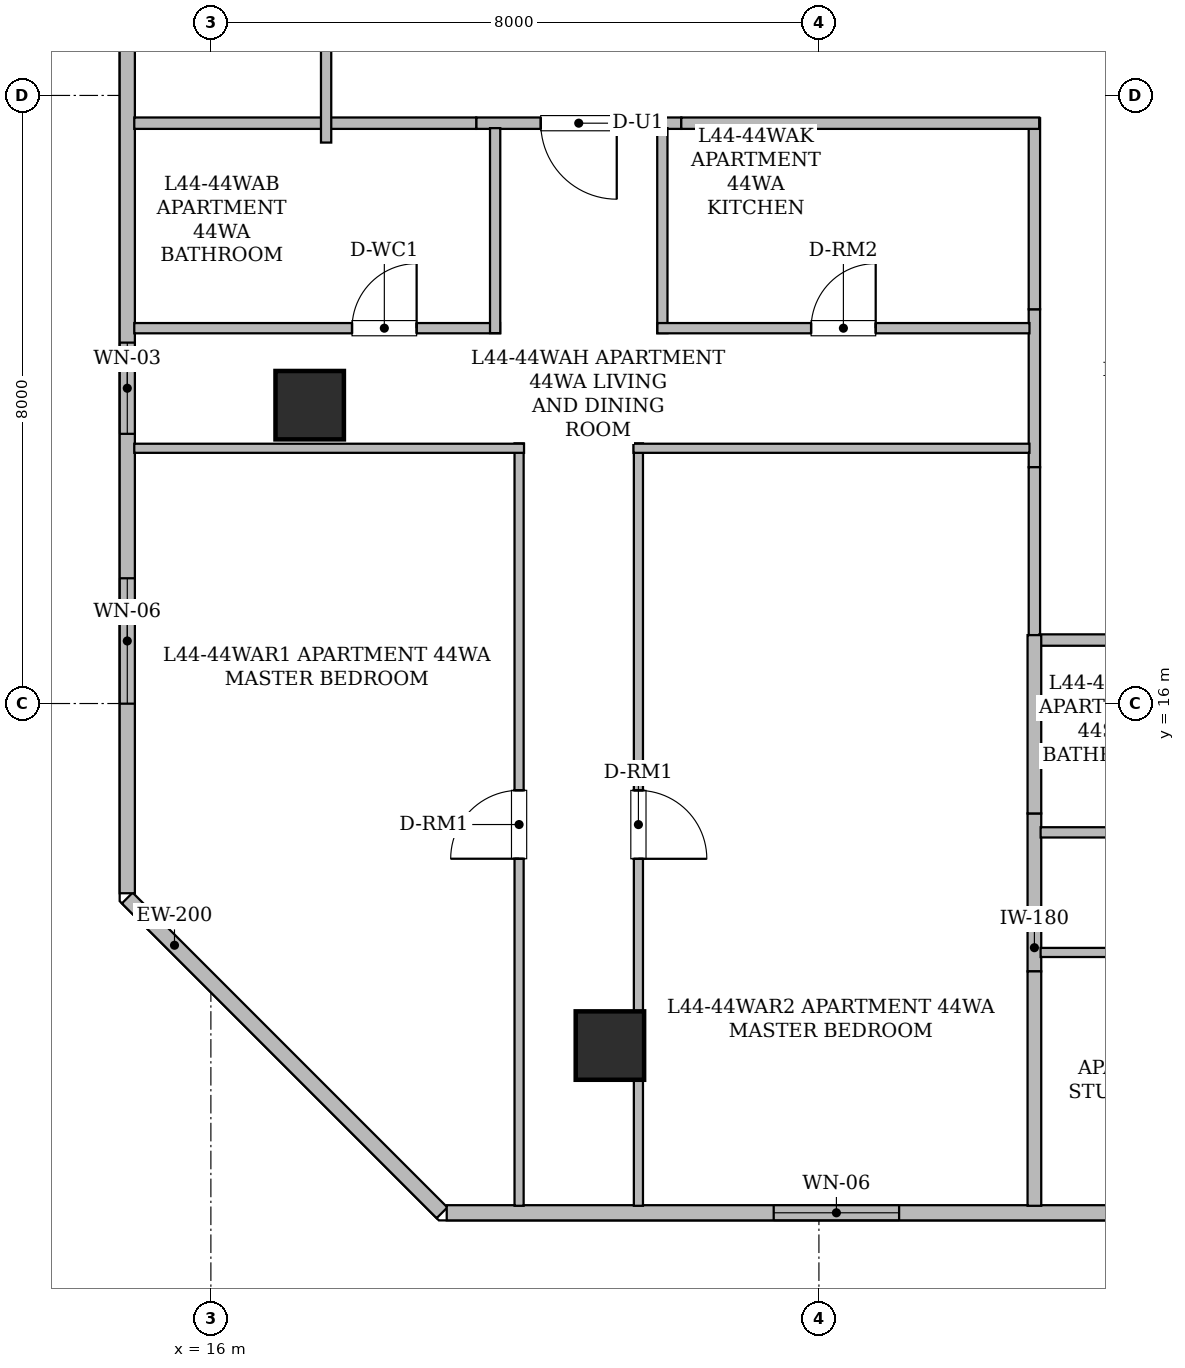
"""IFC4 building model, lengths in metres.
Left out: names, types, materials, properties, quantities, classifications, styles, units other than length and angle.
Written with IfcOpenShell. Run it as: python <this file> out.ifc"""

import sys

from ifc_helpers import new_model, si_unit, direction, frame, frame_2d, origin, origin_2d, place, context, subcontext, project, spatial, rectangle, hollow_rectangle, extrude, element, fill, save


model = new_model("IFC4")
c1 = context("Model", 3, precision=1e-05, world=origin(), true_north=direction((0.0, 1.0)))
c2 = subcontext(c1, "Body", "Model", "MODEL_VIEW")
j1 = project(units=[si_unit("LENGTHUNIT", "METRE"), si_unit("PLANEANGLEUNIT", "RADIAN")], contexts=[c1])
p1 = place(None, origin())
s1 = spatial("IfcSite", under=j1, at=p1, CompositionType="ELEMENT")
p2 = place(p1, origin())
s2 = spatial("IfcBuilding", under=s1, at=p2, CompositionType="ELEMENT")
p3 = place(p2, frame((0.0, 0.0, 174.15)))
s3 = spatial("IfcBuildingStorey", under=s2, at=p3, CompositionType="ELEMENT", Elevation=174.15)
for number, where, z_axis, x_axis in (
    (1, (21.25, 11.5, 0.0), (0.0, 0.0, 1.0), (1.0, 0.0, 0.0)),
    (2, (17.3, 19.925, 0.0), (0.0, 0.0, 1.0), (1.0, 0.0, 0.0)),
):
    element("IfcColumn", number, at=place(p3, frame(where, z_axis=z_axis, x_axis=x_axis)), inside=s3, PredefinedType="COLUMN", context=c2, shape_type="SweptSolid", body=[
        extrude(hollow_rectangle(XDim=0.9, YDim=0.9, WallThickness=0.045, at=origin_2d()), origin(), (0.0, 0.0, 1.0), 3.65),
    ])
p4 = place(p3, frame((19.041, 9.3, 0.0), z_axis=(0.0, 0.0, 1.0), x_axis=(-0.707127625344, 0.707085936414, 0.0)))
e3 = element("IfcWall", 3, at=p4, inside=s3, PredefinedType="STANDARD", context=c2, shape_type="SweptSolid", body=[
    extrude(rectangle(XDim=5.856, YDim=0.2, at=frame_2d((2.928, 0.0))), origin(), (0.0, 0.0, 1.0), 3.43),
])
p5 = place(p3, frame((14.9, 13.504, 0.0), z_axis=(0.0, 0.0, 1.0), x_axis=(0.0, 1.0, 0.0)))
e4 = element("IfcWall", 4, at=p5, inside=s3, PredefinedType="STANDARD", context=c2, shape_type="SweptSolid", body=[
    extrude(rectangle(XDim=11.263, YDim=0.2, at=frame_2d((5.632, 0.0))), origin(), (0.0, 0.0, 1.0), 3.43),
])
p6 = place(p5, frame((6.044, 0.0, 0.8)))
e5 = element("IfcOpeningElement", 5, at=p6, cuts=e4, PredefinedType="OPENING", context=c2, shape_type="SweptSolid", body=[
    extrude(rectangle(XDim=1.2, YDim=1.5, at=frame_2d((0.6, 0.75))), frame((0.0, 0.11, 0.0), z_axis=(0.0, -1.0, 0.0), x_axis=(1.0, 0.0, 0.0)), (0.0, 0.0, 1.0), 0.22),
])
p7 = place(p5, frame((2.494, 0.0, 0.85)))
e6 = element("IfcOpeningElement", 6, at=p7, cuts=e4, PredefinedType="OPENING", context=c2, shape_type="SweptSolid", body=[
    extrude(rectangle(XDim=1.65, YDim=1.55, at=frame_2d((0.825, 0.775))), frame((0.0, 0.11, 0.0), z_axis=(0.0, -1.0, 0.0), x_axis=(1.0, 0.0, 0.0)), (0.0, 0.0, 1.0), 0.22),
])
p8 = place(p3, frame((58.896, 9.3, 0.0), z_axis=(0.0, 0.0, 1.0), x_axis=(-1.0, 0.0, 0.0)))
e7 = element("IfcWall", 7, at=p8, inside=s3, PredefinedType="STANDARD", context=c2, shape_type="SweptSolid", body=[
    extrude(rectangle(XDim=39.793, YDim=0.2, at=frame_2d((19.896, 0.0))), origin(), (0.0, 0.0, 1.0), 3.43),
])
p9 = place(p8, frame((33.841, 0.0, 0.85)))
e8 = element("IfcOpeningElement", 8, at=p9, cuts=e7, PredefinedType="OPENING", context=c2, shape_type="SweptSolid", body=[
    extrude(rectangle(XDim=1.65, YDim=1.55, at=frame_2d((0.825, 0.775))), frame((0.0, 0.11, 0.0), z_axis=(0.0, -1.0, 0.0), x_axis=(1.0, 0.0, 0.0)), (0.0, 0.0, 1.0), 0.22),
])
p10 = place(p8, frame((27.808, 0.0, 0.85)))
e9 = element("IfcOpeningElement", 9, at=p10, cuts=e7, PredefinedType="OPENING", context=c2, shape_type="SweptSolid", body=[
    extrude(rectangle(XDim=1.65, YDim=1.55, at=frame_2d((0.825, 0.775))), frame((0.0, 0.11, 0.0), z_axis=(0.0, -1.0, 0.0), x_axis=(1.0, 0.0, 0.0)), (0.0, 0.0, 1.0), 0.22),
])
p11 = place(p8, frame((20.418, 0.0, 0.85)))
e10 = element("IfcOpeningElement", 10, at=p11, cuts=e7, PredefinedType="OPENING", context=c2, shape_type="SweptSolid", body=[
    extrude(rectangle(XDim=1.65, YDim=1.55, at=frame_2d((0.825, 0.775))), frame((0.0, 0.11, 0.0), z_axis=(0.0, -1.0, 0.0), x_axis=(1.0, 0.0, 0.0)), (0.0, 0.0, 1.0), 0.22),
])
p12 = place(p8, frame((14.869, 0.0, 0.85)))
e11 = element("IfcOpeningElement", 11, at=p12, cuts=e7, PredefinedType="OPENING", context=c2, shape_type="SweptSolid", body=[
    extrude(rectangle(XDim=1.65, YDim=1.55, at=frame_2d((0.825, 0.775))), frame((0.0, 0.11, 0.0), z_axis=(0.0, -1.0, 0.0), x_axis=(1.0, 0.0, 0.0)), (0.0, 0.0, 1.0), 0.22),
])
p13 = place(p8, frame((12.718, 0.0, 0.8)))
e12 = element("IfcOpeningElement", 12, at=p13, cuts=e7, PredefinedType="OPENING", context=c2, shape_type="SweptSolid", body=[
    extrude(rectangle(XDim=1.2, YDim=1.5, at=frame_2d((0.6, 0.75))), frame((0.0, 0.11, 0.0), z_axis=(0.0, -1.0, 0.0), x_axis=(1.0, 0.0, 0.0)), (0.0, 0.0, 1.0), 0.22),
])
p14 = place(p8, frame((8.394, 0.0, 0.85)))
e13 = element("IfcOpeningElement", 13, at=p14, cuts=e7, PredefinedType="OPENING", context=c2, shape_type="SweptSolid", body=[
    extrude(rectangle(XDim=1.65, YDim=1.55, at=frame_2d((0.825, 0.775))), frame((0.0, 0.11, 0.0), z_axis=(0.0, -1.0, 0.0), x_axis=(1.0, 0.0, 0.0)), (0.0, 0.0, 1.0), 0.22),
])
p15 = place(p8, frame((2.936, 0.0, 0.85)))
e14 = element("IfcOpeningElement", 14, at=p15, cuts=e7, PredefinedType="OPENING", context=c2, shape_type="SweptSolid", body=[
    extrude(rectangle(XDim=1.65, YDim=1.55, at=frame_2d((0.825, 0.775))), frame((0.0, 0.11, 0.0), z_axis=(0.0, -1.0, 0.0), x_axis=(1.0, 0.0, 0.0)), (0.0, 0.0, 1.0), 0.22),
])
p16 = place(p3, frame((26.835, 19.109, 0.0), z_axis=(0.0, 0.0, 1.0), x_axis=(0.0, 1.0, 0.0)))
e15 = element("IfcWall", 15, at=p16, inside=s3, PredefinedType="STANDARD", context=c2, shape_type="SweptSolid", body=[
    extrude(rectangle(XDim=2.078, YDim=0.15, at=frame_2d((1.039, 0.0))), origin(), (0.0, 0.0, 1.0), 2.725),
])
p17 = place(p3, frame((22.189, 23.635, 0.0), z_axis=(0.0, 0.0, 1.0), x_axis=(-1.0, 0.0, 0.0)))
e16 = element("IfcWall", 16, at=p17, inside=s3, PredefinedType="STANDARD", context=c2, shape_type="SweptSolid", body=[
    extrude(rectangle(XDim=2.698, YDim=0.15, at=frame_2d((1.349, 0.0))), origin(), (0.0, 0.0, 1.0), 3.43),
])
p18 = place(p17, frame((0.849, 0.0, 0.0)))
e17 = element("IfcOpeningElement", 17, at=p18, cuts=e16, PredefinedType="OPENING", context=c2, shape_type="SweptSolid", body=[
    extrude(rectangle(XDim=1.0, YDim=2.15, at=frame_2d((0.5, 1.075))), frame((0.0, 0.085, 0.0), z_axis=(0.0, -1.0, 0.0), x_axis=(1.0, 0.0, 0.0)), (0.0, 0.0, 1.0), 0.17),
])
p19 = place(p3, frame((19.491, 23.635, 0.0), z_axis=(0.0, 0.0, 1.0), x_axis=(-1.0, 0.0, 0.0)))
e18 = element("IfcWall", 18, at=p19, inside=s3, PredefinedType="STANDARD", context=c2, shape_type="SweptSolid", body=[
    extrude(rectangle(XDim=4.499, YDim=0.15, at=frame_2d((2.25, 0.0))), origin(), (0.0, 0.0, 1.0), 2.876),
])
p20 = place(p3, frame((26.835, 21.187, 0.0), z_axis=(0.0, 0.0, 1.0), x_axis=(0.0, 1.0, 0.0)))
e19 = element("IfcWall", 19, at=p20, inside=s3, PredefinedType="STANDARD", context=c2, shape_type="SweptSolid", body=[
    extrude(rectangle(XDim=2.513, YDim=0.15, at=frame_2d((1.256, 0.0))), origin(), (0.0, 0.0, 1.0), 3.43),
])
p21 = place(p3, frame((26.898, 23.635, 0.0), z_axis=(0.0, 0.0, 1.0), x_axis=(-1.0, 0.0, 0.0)))
e20 = element("IfcWall", 20, at=p21, inside=s3, PredefinedType="STANDARD", context=c2, shape_type="SweptSolid", body=[
    extrude(rectangle(XDim=4.709, YDim=0.15, at=frame_2d((2.354, 0.0))), origin(), (0.0, 0.0, 1.0), 3.43),
])
p22 = place(p3, frame((26.835, 16.9, 0.0), z_axis=(0.0, 0.0, 1.0), x_axis=(0.0, 1.0, 0.0)))
e21 = element("IfcWall", 21, at=p22, inside=s3, PredefinedType="STANDARD", context=c2, shape_type="SweptSolid", body=[
    extrude(rectangle(XDim=2.209, YDim=0.15, at=frame_2d((1.104, 0.0))), origin(), (0.0, 0.0, 1.0), 2.725),
])
p23 = place(p3, frame((31.726, 16.835, 0.0), z_axis=(0.0, 0.0, 1.0), x_axis=(-1.0, 0.0, 0.0)))
e22 = element("IfcWall", 22, at=p23, inside=s3, PredefinedType="STANDARD", context=c2, shape_type="SweptSolid", body=[
    extrude(rectangle(XDim=4.826, YDim=0.15, at=frame_2d((2.413, 0.0))), origin(), (0.0, 0.0, 1.0), 2.725),
])
p24 = place(p3, frame((14.992, 20.938, 0.0), z_axis=(0.0, 0.0, 1.0), x_axis=(1.0, 0.0, 0.0)))
e23 = element("IfcWall", 23, at=p24, inside=s3, PredefinedType="PARTITIONING", context=c2, shape_type="SweptSolid", body=[
    extrude(rectangle(XDim=4.813, YDim=0.135, at=frame_2d((2.406, 0.0))), origin(), (0.0, 0.0, 1.0), 2.876),
])
p25 = place(p24, frame((2.865, 0.0, 0.0)))
e24 = element("IfcOpeningElement", 24, at=p25, cuts=e23, PredefinedType="OPENING", context=c2, shape_type="SweptSolid", body=[
    extrude(rectangle(XDim=0.85, YDim=2.1, at=frame_2d((0.425, 1.05))), frame((0.0, 0.077, 0.0), z_axis=(0.0, -1.0, 0.0), x_axis=(1.0, 0.0, 0.0)), (0.0, 0.0, 1.0), 0.155),
])
for number, where, z_axis, x_axis in (
    (25, (19.74, 20.873, 0.0), (0.0, 0.0, 1.0), (0.0, 1.0, 0.0)),
    (26, (21.94, 23.57, 0.0), (0.0, 0.0, 1.0), (0.0, -1.0, 0.0)),
):
    element("IfcWall", number, at=place(p3, frame(where, z_axis=z_axis, x_axis=x_axis)), inside=s3, PredefinedType="PARTITIONING", context=c2, shape_type="SweptSolid", body=[
        extrude(rectangle(XDim=2.697, YDim=0.135, at=frame_2d((1.349, 0.0))), origin(), (0.0, 0.0, 1.0), 3.43),
    ])
p26 = place(p3, frame((21.875, 20.938, 0.0), z_axis=(0.0, 0.0, 1.0), x_axis=(1.0, 0.0, 0.0)))
e27 = element("IfcWall", 27, at=p26, inside=s3, PredefinedType="PARTITIONING", context=c2, shape_type="SweptSolid", body=[
    extrude(rectangle(XDim=4.895, YDim=0.135, at=frame_2d((2.448, 0.0))), origin(), (0.0, 0.0, 1.0), 3.43),
])
p27 = place(p26, frame((2.022, 0.0, 0.0)))
e28 = element("IfcOpeningElement", 28, at=p27, cuts=e27, PredefinedType="OPENING", context=c2, shape_type="SweptSolid", body=[
    extrude(rectangle(XDim=0.85, YDim=2.1, at=frame_2d((0.425, 1.05))), frame((0.0, 0.077, 0.0), z_axis=(0.0, -1.0, 0.0), x_axis=(1.0, 0.0, 0.0)), (0.0, 0.0, 1.0), 0.155),
])
p28 = place(p3, frame((20.055, 9.392, 0.0), z_axis=(0.0, 0.0, 1.0), x_axis=(0.0, 1.0, 0.0)))
e29 = element("IfcWall", 29, at=p28, inside=s3, PredefinedType="PARTITIONING", context=c2, shape_type="SweptSolid", body=[
    extrude(rectangle(XDim=10.031, YDim=0.12, at=frame_2d((5.016, 0.0))), origin(), (0.0, 0.0, 1.0), 2.876),
])
p29 = place(p28, frame((4.566, 0.0, 0.0)))
e30 = element("IfcOpeningElement", 30, at=p29, cuts=e29, PredefinedType="OPENING", context=c2, shape_type="SweptSolid", body=[
    extrude(rectangle(XDim=0.9, YDim=2.1, at=frame_2d((0.45, 1.05))), frame((0.0, 0.07, 0.0), z_axis=(0.0, -1.0, 0.0), x_axis=(1.0, 0.0, 0.0)), (0.0, 0.0, 1.0), 0.14),
])
p30 = place(p3, frame((20.12, 19.358, 0.0), z_axis=(0.0, 0.0, 1.0), x_axis=(-1.0, 0.0, 0.0)))
e31 = element("IfcWall", 31, at=p30, inside=s3, PredefinedType="PARTITIONING", context=c2, shape_type="SweptSolid", body=[
    extrude(rectangle(XDim=5.128, YDim=0.12, at=frame_2d((2.564, 0.0))), origin(), (0.0, 0.0, 1.0), 2.725),
])
p31 = place(p3, frame((21.625, 19.423, 0.0), z_axis=(0.0, 0.0, 1.0), x_axis=(0.0, -1.0, 0.0)))
e32 = element("IfcWall", 32, at=p31, inside=s3, PredefinedType="PARTITIONING", context=c2, shape_type="SweptSolid", body=[
    extrude(rectangle(XDim=10.031, YDim=0.12, at=frame_2d((5.016, 0.0))), origin(), (0.0, 0.0, 1.0), 2.725),
])
p32 = place(p31, frame((4.566, 0.0, 0.0)))
e33 = element("IfcOpeningElement", 33, at=p32, cuts=e32, PredefinedType="OPENING", context=c2, shape_type="SweptSolid", body=[
    extrude(rectangle(XDim=0.9, YDim=2.1, at=frame_2d((0.45, 1.05))), frame((0.0, 0.07, 0.0), z_axis=(0.0, -1.0, 0.0), x_axis=(1.0, 0.0, 0.0)), (0.0, 0.0, 1.0), 0.14),
])
p33 = place(p3, frame((26.77, 19.358, 0.0), z_axis=(0.0, 0.0, 1.0), x_axis=(-1.0, 0.0, 0.0)))
e34 = element("IfcWall", 34, at=p33, inside=s3, PredefinedType="PARTITIONING", context=c2, shape_type="SweptSolid", body=[
    extrude(rectangle(XDim=5.21, YDim=0.12, at=frame_2d((2.605, 0.0))), origin(), (0.0, 0.0, 1.0), 2.725),
])
p34 = place(p3, frame((26.835, 14.554, 0.0), z_axis=(0.0, 0.0, 1.0), x_axis=(0.0, -1.0, 0.0)))
e35 = element("IfcWall", 35, at=p34, inside=s3, PredefinedType="STANDARD", context=c2, shape_type="SweptSolid", body=[
    extrude(rectangle(XDim=2.078, YDim=0.18, at=frame_2d((1.039, 0.0))), origin(), (0.0, 0.0, 1.0), 2.961),
])
p35 = place(p3, frame((26.835, 16.9, 0.0), z_axis=(0.0, 0.0, 1.0), x_axis=(0.0, -1.0, 0.0)))
e36 = element("IfcWall", 36, at=p35, inside=s3, PredefinedType="STANDARD", context=c2, shape_type="SweptSolid", body=[
    extrude(rectangle(XDim=2.346, YDim=0.18, at=frame_2d((1.173, 0.0))), origin(), (0.0, 0.0, 1.0), 2.725),
])
p36 = place(p3, frame((26.835, 12.476, 0.0), z_axis=(0.0, 0.0, 1.0), x_axis=(0.0, -1.0, 0.0)))
e37 = element("IfcWall", 37, at=p36, inside=s3, PredefinedType="STANDARD", context=c2, shape_type="SweptSolid", body=[
    extrude(rectangle(XDim=3.084, YDim=0.18, at=frame_2d((1.542, 0.0))), origin(), (0.0, 0.0, 1.0), 2.876),
])
p37 = place(p3, frame((17.516, 23.38, 0.0), z_axis=(0.0, 0.0, 1.0), x_axis=(0.0, 1.0, 0.0)))
e38 = element("IfcWall", 38, at=p37, inside=s3, PredefinedType="PARTITIONING", context=c2, shape_type="SweptSolid", body=[
    extrude(rectangle(XDim=8.78, YDim=0.135, at=frame_2d((4.39, 0.0))), origin(), (0.0, 0.0, 1.0), 2.876),
])
p38 = place(p37, frame((2.655, 0.0, 0.0)))
e39 = element("IfcOpeningElement", 39, at=p38, cuts=e38, PredefinedType="OPENING", context=c2, shape_type="SweptSolid", body=[
    extrude(rectangle(XDim=0.85, YDim=2.1, at=frame_2d((0.425, 1.05))), frame((0.0, 0.077, 0.0), z_axis=(0.0, -1.0, 0.0), x_axis=(1.0, 0.0, 0.0)), (0.0, 0.0, 1.0), 0.155),
])
p39 = place(p3, frame((26.917, 14.305, 0.0), z_axis=(0.0, 0.0, 1.0), x_axis=(1.0, 0.0, 0.0)))
e40 = element("IfcWall", 40, at=p39, inside=s3, PredefinedType="PARTITIONING", context=c2, shape_type="SweptSolid", body=[
    extrude(rectangle(XDim=5.123, YDim=0.135, at=frame_2d((2.562, 0.0))), origin(), (0.0, 0.0, 1.0), 2.725),
])
p40 = place(p39, frame((2.137, 0.0, 0.0)))
e41 = element("IfcOpeningElement", 41, at=p40, cuts=e40, PredefinedType="OPENING", context=c2, shape_type="SweptSolid", body=[
    extrude(rectangle(XDim=0.85, YDim=2.1, at=frame_2d((0.425, 1.05))), frame((0.0, 0.077, 0.0), z_axis=(0.0, -1.0, 0.0), x_axis=(1.0, 0.0, 0.0)), (0.0, 0.0, 1.0), 0.155),
])
p41 = place(p3, frame((33.939, 12.725, 0.0), z_axis=(0.0, 0.0, 1.0), x_axis=(-1.0, 0.0, 0.0)))
e42 = element("IfcWall", 42, at=p41, inside=s3, PredefinedType="PARTITIONING", context=c2, shape_type="SweptSolid", body=[
    extrude(rectangle(XDim=7.022, YDim=0.12, at=frame_2d((3.511, 0.0))), origin(), (0.0, 0.0, 1.0), 2.725),
])
p42 = place(p41, frame((3.082, 0.0, 0.0)))
e43 = element("IfcOpeningElement", 43, at=p42, cuts=e42, PredefinedType="OPENING", context=c2, shape_type="SweptSolid", body=[
    extrude(rectangle(XDim=0.9, YDim=2.1, at=frame_2d((0.45, 1.05))), frame((0.0, 0.07, 0.0), z_axis=(0.0, -1.0, 0.0), x_axis=(1.0, 0.0, 0.0)), (0.0, 0.0, 1.0), 0.14),
])
p43 = place(p6, origin())
e44 = element("IfcWindow", 44, at=p43, inside=s3, PartitioningType="SINGLE_PANEL", PredefinedType="WINDOW", context=c2, shape_type="SweptSolid", body=[
    extrude(rectangle(XDim=1.2, YDim=1.5, at=frame_2d((0.6, 0.75))), frame((0.0, 0.03, 0.0), z_axis=(0.0, -1.0, 0.0), x_axis=(1.0, 0.0, 0.0)), (0.0, 0.0, 1.0), 0.06),
])
fill(e5, e44)
p44 = place(p7, origin())
e45 = element("IfcWindow", 45, at=p44, inside=s3, PartitioningType="SINGLE_PANEL", PredefinedType="WINDOW", context=c2, shape_type="SweptSolid", body=[
    extrude(rectangle(XDim=1.65, YDim=1.55, at=frame_2d((0.825, 0.775))), frame((0.0, 0.03, 0.0), z_axis=(0.0, -1.0, 0.0), x_axis=(1.0, 0.0, 0.0)), (0.0, 0.0, 1.0), 0.06),
])
fill(e6, e45)
p45 = place(p9, origin())
e46 = element("IfcWindow", 46, at=p45, inside=s3, PartitioningType="SINGLE_PANEL", PredefinedType="WINDOW", context=c2, shape_type="SweptSolid", body=[
    extrude(rectangle(XDim=1.65, YDim=1.55, at=frame_2d((0.825, 0.775))), frame((0.0, 0.03, 0.0), z_axis=(0.0, -1.0, 0.0), x_axis=(1.0, 0.0, 0.0)), (0.0, 0.0, 1.0), 0.06),
])
fill(e8, e46)
p46 = place(p18, origin())
e47 = element("IfcDoor", 47, at=p46, inside=s3, OperationType="SINGLE_SWING_LEFT", PredefinedType="DOOR", context=c2, shape_type="SweptSolid", body=[
    extrude(rectangle(XDim=1.0, YDim=2.15, at=frame_2d((0.5, 1.075))), frame((0.0, 0.025, 0.0), z_axis=(0.0, -1.0, 0.0), x_axis=(1.0, 0.0, 0.0)), (0.0, 0.0, 1.0), 0.05),
])
fill(e17, e47)
p47 = place(p25, origin())
e48 = element("IfcDoor", 48, at=p47, inside=s3, OperationType="SINGLE_SWING_RIGHT", PredefinedType="DOOR", context=c2, shape_type="SweptSolid", body=[
    extrude(rectangle(XDim=0.85, YDim=2.1, at=frame_2d((0.425, 1.05))), frame((0.0, 0.025, 0.0), z_axis=(0.0, -1.0, 0.0), x_axis=(1.0, 0.0, 0.0)), (0.0, 0.0, 1.0), 0.05),
])
fill(e24, e48)
p48 = place(p27, origin())
e49 = element("IfcDoor", 49, at=p48, inside=s3, OperationType="SINGLE_SWING_RIGHT", PredefinedType="DOOR", context=c2, shape_type="SweptSolid", body=[
    extrude(rectangle(XDim=0.85, YDim=2.1, at=frame_2d((0.425, 1.05))), frame((0.0, 0.025, 0.0), z_axis=(0.0, -1.0, 0.0), x_axis=(1.0, 0.0, 0.0)), (0.0, 0.0, 1.0), 0.05),
])
fill(e28, e49)
p49 = place(p29, origin())
e50 = element("IfcDoor", 50, at=p49, inside=s3, OperationType="SINGLE_SWING_LEFT", PredefinedType="DOOR", context=c2, shape_type="SweptSolid", body=[
    extrude(rectangle(XDim=0.9, YDim=2.1, at=frame_2d((0.45, 1.05))), frame((0.0, 0.025, 0.0), z_axis=(0.0, -1.0, 0.0), x_axis=(1.0, 0.0, 0.0)), (0.0, 0.0, 1.0), 0.05),
])
fill(e30, e50)
p50 = place(p32, origin())
e51 = element("IfcDoor", 51, at=p50, inside=s3, OperationType="SINGLE_SWING_RIGHT", PredefinedType="DOOR", context=c2, shape_type="SweptSolid", body=[
    extrude(rectangle(XDim=0.9, YDim=2.1, at=frame_2d((0.45, 1.05))), frame((0.0, 0.025, 0.0), z_axis=(0.0, -1.0, 0.0), x_axis=(1.0, 0.0, 0.0)), (0.0, 0.0, 1.0), 0.05),
])
fill(e33, e51)
save(model, sys.argv[1])
